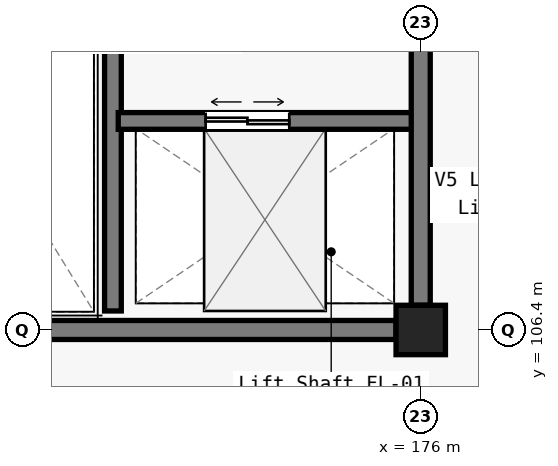
"""IFC4 building model, lengths in metres.
Left out: names, types, materials, properties, quantities, classifications, styles, units other than length and angle.
Written with IfcOpenShell. Run it as: python <this file> out.ifc"""

import sys

from ifc_helpers import new_model, si_unit, direction, frame, frame_2d, origin, origin_2d, place, context, subcontext, project, spatial, rectangle, circle, extrude, element, fill, save


model = new_model("IFC4")
c1 = context("Model", 3, precision=1e-05, world=origin(), true_north=direction((0.0, 1.0)))
c2 = subcontext(c1, "Body", "Model", "MODEL_VIEW")
j1 = project(units=[si_unit("LENGTHUNIT", "METRE"), si_unit("PLANEANGLEUNIT", "RADIAN")], contexts=[c1])
p1 = place(None, origin())
s1 = spatial("IfcSite", under=j1, at=p1, CompositionType="ELEMENT")
p2 = place(p1, origin())
s2 = spatial("IfcBuilding", under=s1, at=p2, CompositionType="ELEMENT")
p3 = place(p2, frame((0.0, 0.0, 24.6)))
s3 = spatial("IfcBuildingStorey", under=s2, at=p3, CompositionType="ELEMENT", Elevation=24.6)
p4 = place(p3, frame((176.0, 106.4, 0.0), z_axis=(0.0, 0.0, 1.0), x_axis=(1.0, 0.0, 0.0)))
e1 = element("IfcColumn", 1, at=p4, inside=s3, PredefinedType="COLUMN", context=c2, shape_type="SweptSolid", body=[
    extrude(circle(Radius=0.325, at=origin_2d()), origin(), (0.0, 0.0, 1.0), 4.8),
])
p5 = place(p3, frame((168.4, 106.4, 0.0), z_axis=(0.0, 0.0, 1.0), x_axis=(1.0, 0.0, 0.0)))
e2 = element("IfcWall", 2, at=p5, inside=s3, PredefinedType="SOLIDWALL", context=c2, shape_type="SweptSolid", body=[
    extrude(rectangle(XDim=7.275, YDim=0.25, at=frame_2d((3.638, 0.0))), origin(), (0.0, 0.0, 1.0), 3.9),
])
p6 = place(p3, frame((171.95, 106.65, 0.0), z_axis=(0.0, 0.0, 1.0), x_axis=(0.0, 1.0, 0.0)))
e3 = element("IfcWall", 3, at=p6, inside=s3, PredefinedType="SOLIDWALL", context=c2, shape_type="SweptSolid", body=[
    extrude(rectangle(XDim=7.1, YDim=0.22, at=frame_2d((3.55, 0.0))), origin(), (0.0, 0.0, 1.0), 4.55),
])
p7 = place(p6, frame((5.55, 0.0, 0.0)))
e4 = element("IfcOpeningElement", 4, at=p7, cuts=e3, PredefinedType="OPENING", context=c2, shape_type="SweptSolid", body=[
    extrude(rectangle(XDim=1.2, YDim=2.15, at=frame_2d((0.6, 1.075))), frame((0.0, 0.12, 0.0), z_axis=(0.0, -1.0, 0.0), x_axis=(1.0, 0.0, 0.0)), (0.0, 0.0, 1.0), 0.24),
])
p8 = place(p3, frame((172.02, 109.15, 0.0), z_axis=(0.0, 0.0, 1.0), x_axis=(1.0, 0.0, 0.0)))
e5 = element("IfcWall", 5, at=p8, inside=s3, PredefinedType="SOLIDWALL", context=c2, shape_type="SweptSolid", body=[
    extrude(rectangle(XDim=3.93, YDim=0.22, at=frame_2d((1.965, 0.0))), origin(), (0.0, 0.0, 1.0), 3.9),
])
p9 = place(p8, frame((1.15, 0.0, 0.0)))
e6 = element("IfcOpeningElement", 6, at=p9, cuts=e5, PredefinedType="OPENING", context=c2, shape_type="SweptSolid", body=[
    extrude(rectangle(XDim=1.1, YDim=2.2, at=frame_2d((0.55, 1.1))), frame((0.0, 0.12, 0.0), z_axis=(0.0, -1.0, 0.0), x_axis=(1.0, 0.0, 0.0)), (0.0, 0.0, 1.0), 0.24),
])
p10 = place(p3, frame((176.0, 106.725, 0.0), z_axis=(0.0, 0.0, 1.0), x_axis=(0.0, 1.0, 0.0)))
e7 = element("IfcWall", 7, at=p10, inside=s3, PredefinedType="SOLIDWALL", context=c2, shape_type="SweptSolid", body=[
    extrude(rectangle(XDim=6.875, YDim=0.25, at=frame_2d((3.438, 0.0))), origin(), (0.0, 0.0, 1.0), 3.9),
])
p11 = place(p10, frame((3.525, 0.0, 0.0)))
e8 = element("IfcOpeningElement", 8, at=p11, cuts=e7, PredefinedType="OPENING", context=c2, shape_type="SweptSolid", body=[
    extrude(rectangle(XDim=1.35, YDim=2.2, at=frame_2d((0.675, 1.1))), frame((0.0, 0.135, 0.0), z_axis=(0.0, -1.0, 0.0), x_axis=(1.0, 0.0, 0.0)), (0.0, 0.0, 1.0), 0.27),
])
p12 = place(p9, origin())
e9 = element("IfcDoor", 9, at=p12, inside=s3, OperationType="DOUBLE_DOOR_SLIDING", PredefinedType="DOOR", context=c2, shape_type="SweptSolid", body=[
    extrude(rectangle(XDim=1.1, YDim=2.2, at=frame_2d((0.55, 1.1))), frame((0.0, 0.025, 0.0), z_axis=(0.0, -1.0, 0.0), x_axis=(1.0, 0.0, 0.0)), (0.0, 0.0, 1.0), 0.05),
])
fill(e6, e9)
save(model, sys.argv[1])
